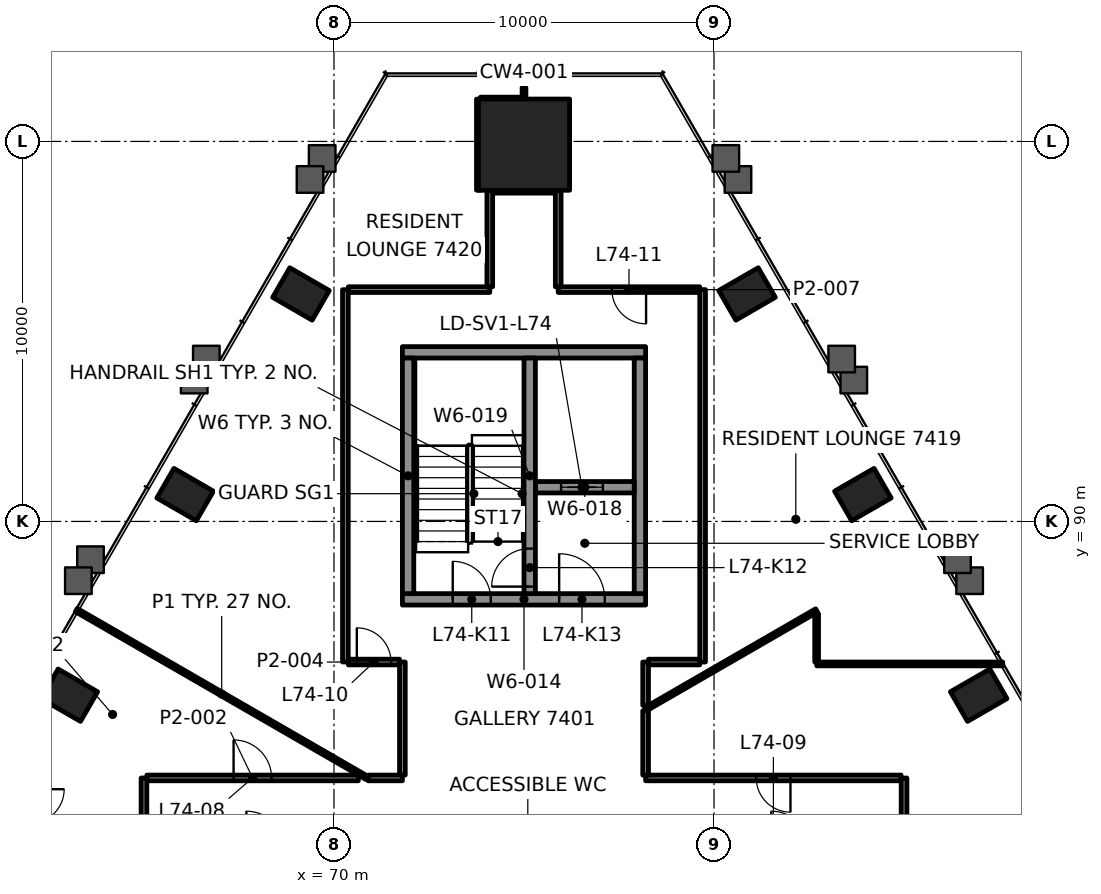
"""IFC4 building model, lengths in metres.
Left out: names, types, materials, properties, quantities, classifications, styles, units other than length and angle.
Written with IfcOpenShell. Run it as: python <this file> out.ifc"""

import sys

from ifc_helpers import new_model, si_unit, direction, frame, frame_2d, origin, origin_2d, place, context, subcontext, project, spatial, rectangle, hollow_rectangle, extrude, element, fill, save


model = new_model("IFC4")
c1 = context("Model", 3, precision=1e-05, world=origin(), true_north=direction((0.0, 1.0)))
c2 = subcontext(c1, "Body", "Model", "MODEL_VIEW")
j1 = project(units=[si_unit("LENGTHUNIT", "METRE"), si_unit("PLANEANGLEUNIT", "RADIAN")], contexts=[c1])
p1 = place(None, origin())
s1 = spatial("IfcSite", under=j1, at=p1, CompositionType="ELEMENT")
p2 = place(p1, origin())
s2 = spatial("IfcBuilding", under=s1, at=p2, CompositionType="ELEMENT")
p3 = place(p2, frame((0.0, 0.0, 305.6)))
s3 = spatial("IfcBuildingStorey", under=s2, at=p3, CompositionType="ELEMENT", Elevation=305.6)
p4 = place(p3, frame((75.0, 99.915, 0.0), z_axis=(0.0, 0.0, 1.0), x_axis=(-1.0, 0.0, 0.0)))
e1 = element("IfcColumn", 1, at=p4, inside=s3, PredefinedType="COLUMN", context=c2, shape_type="SweptSolid", body=[
    extrude(rectangle(XDim=2.4, YDim=2.4, at=origin_2d()), origin(), (0.0, 0.0, 1.0), 3.5),
])
for number, where, z_axis, x_axis in (
    (2, (86.965, 85.427, -0.0), (0.0, 0.0, 1.0), (-0.5, 0.866, 0.0)),
    (3, (83.917, 90.707, -0.0), (0.0, 0.0, 1.0), (-0.5, 0.866, 0.0)),
    (4, (80.869, 95.986, -0.0), (0.0, 0.0, 1.0), (-0.5, 0.866, 0.0)),
    (5, (69.131, 95.986, -0.0), (0.0, 0.0, 1.0), (-0.5, -0.866, 0.0)),
    (6, (66.083, 90.707, -0.0), (0.0, 0.0, 1.0), (-0.5, -0.866, 0.0)),
    (7, (63.035, 85.427, -0.0), (0.0, 0.0, 1.0), (-0.5, -0.866, 0.0)),
):
    element("IfcColumn", number, at=place(p3, frame(where, z_axis=z_axis, x_axis=x_axis)), inside=s3, PredefinedType="COLUMN", context=c2, shape_type="SweptSolid", body=[
        extrude(hollow_rectangle(XDim=0.9, YDim=1.2, WallThickness=0.06, at=origin_2d()), origin(), (0.0, 0.0, 1.0), 3.5),
    ])
p5 = place(p3, frame((71.8, 87.95, 0.0), z_axis=(0.0, 0.0, 1.0), x_axis=(1.0, 0.0, 0.0)))
e8 = element("IfcWall", 8, at=p5, inside=s3, PredefinedType="SHEAR", context=c2, shape_type="SweptSolid", body=[
    extrude(rectangle(XDim=6.4, YDim=0.3, at=frame_2d((3.2, 0.0))), origin(), (0.0, 0.0, 1.0), 3.3),
])
p6 = place(p5, frame((1.325, 0.0, 0.0)))
e9 = element("IfcOpeningElement", 9, at=p6, cuts=e8, PredefinedType="OPENING", context=c2, shape_type="SweptSolid", body=[
    extrude(rectangle(XDim=1.0, YDim=2.1, at=frame_2d((0.5, 1.05))), frame((0.0, 0.16, 0.0), z_axis=(0.0, -1.0, 0.0), x_axis=(1.0, 0.0, 0.0)), (0.0, 0.0, 1.0), 0.32),
])
p7 = place(p5, frame((4.125, 0.0, 0.0)))
e10 = element("IfcOpeningElement", 10, at=p7, cuts=e8, PredefinedType="OPENING", context=c2, shape_type="SweptSolid", body=[
    extrude(rectangle(XDim=1.2, YDim=2.1, at=frame_2d((0.6, 1.05))), frame((0.0, 0.16, 0.0), z_axis=(0.0, -1.0, 0.0), x_axis=(1.0, 0.0, 0.0)), (0.0, 0.0, 1.0), 0.32),
])
p8 = place(p3, frame((71.8, 94.45, 0.0), z_axis=(0.0, 0.0, 1.0), x_axis=(1.0, 0.0, 0.0)))
e11 = element("IfcWall", 11, at=p8, inside=s3, PredefinedType="SHEAR", context=c2, shape_type="SweptSolid", body=[
    extrude(rectangle(XDim=6.4, YDim=0.3, at=frame_2d((3.2, 0.0))), origin(), (0.0, 0.0, 1.0), 3.3),
])
for number, where, z_axis, x_axis in (
    (12, (71.95, 88.1, 0.0), (0.0, 0.0, 1.0), (0.0, 1.0, 0.0)),
    (13, (78.05, 88.1, 0.0), (0.0, 0.0, 1.0), (0.0, 1.0, 0.0)),
):
    element("IfcWall", number, at=place(p3, frame(where, z_axis=z_axis, x_axis=x_axis)), inside=s3, PredefinedType="SHEAR", context=c2, shape_type="SweptSolid", body=[
        extrude(rectangle(XDim=6.2, YDim=0.3, at=frame_2d((3.1, 0.0))), origin(), (0.0, 0.0, 1.0), 3.3),
    ])
p9 = place(p3, frame((75.3, 90.9, 0.0), z_axis=(0.0, 0.0, 1.0), x_axis=(1.0, 0.0, 0.0)))
e14 = element("IfcWall", 14, at=p9, inside=s3, PredefinedType="SHEAR", context=c2, shape_type="SweptSolid", body=[
    extrude(rectangle(XDim=2.6, YDim=0.3, at=frame_2d((1.3, 0.0))), origin(), (0.0, 0.0, 1.0), 3.3),
])
p10 = place(p9, frame((0.675, 0.0, 0.0)))
e15 = element("IfcOpeningElement", 15, at=p10, cuts=e14, PredefinedType="OPENING", context=c2, shape_type="SweptSolid", body=[
    extrude(rectangle(XDim=1.1, YDim=2.1, at=frame_2d((0.55, 1.05))), frame((0.0, 0.16, 0.0), z_axis=(0.0, -1.0, 0.0), x_axis=(1.0, 0.0, 0.0)), (0.0, 0.0, 1.0), 0.32),
])
p11 = place(p3, frame((75.15, 88.1, 0.0), z_axis=(0.0, 0.0, 1.0), x_axis=(0.0, 1.0, 0.0)))
e16 = element("IfcWall", 16, at=p11, inside=s3, PredefinedType="SHEAR", context=c2, shape_type="SweptSolid", body=[
    extrude(rectangle(XDim=6.2, YDim=0.3, at=frame_2d((3.1, 0.0))), origin(), (0.0, 0.0, 1.0), 3.3),
])
p12 = place(p11, frame((0.185, 0.0, 0.0)))
e17 = element("IfcOpeningElement", 17, at=p12, cuts=e16, PredefinedType="OPENING", context=c2, shape_type="SweptSolid", body=[
    extrude(rectangle(XDim=1.0, YDim=2.1, at=frame_2d((0.5, 1.05))), frame((0.0, 0.16, 0.0), z_axis=(0.0, -1.0, 0.0), x_axis=(1.0, 0.0, 0.0)), (0.0, 0.0, 1.0), 0.32),
])
p13 = place(p3, frame((65.075, 83.25, 0.0), z_axis=(0.0, 0.0, 1.0), x_axis=(1.0, 0.0, 0.0)))
e18 = element("IfcWall", 18, at=p13, inside=s3, PredefinedType="PARTITIONING", context=c2, shape_type="SweptSolid", body=[
    extrude(rectangle(XDim=5.565, YDim=0.15, at=frame_2d((2.783, 0.0))), origin(), (0.0, 0.0, 1.0), 2.7),
])
p14 = place(p13, frame((2.283, 0.0, 0.0)))
e19 = element("IfcOpeningElement", 19, at=p14, cuts=e18, PredefinedType="OPENING", context=c2, shape_type="SweptSolid", body=[
    extrude(rectangle(XDim=1.0, YDim=2.1, at=frame_2d((0.5, 1.05))), frame((0.0, 0.085, 0.0), z_axis=(0.0, -1.0, 0.0), x_axis=(1.0, 0.0, 0.0)), (0.0, 0.0, 1.0), 0.17),
])
p15 = place(p3, frame((84.923, 83.25, 0.0), z_axis=(0.0, 0.0, 1.0), x_axis=(-1.0, 0.0, 0.0)))
e20 = element("IfcWall", 20, at=p15, inside=s3, PredefinedType="PARTITIONING", context=c2, shape_type="SweptSolid", body=[
    extrude(rectangle(XDim=6.723, YDim=0.15, at=frame_2d((3.362, 0.0))), origin(), (0.0, 0.0, 1.0), 2.7),
])
p16 = place(p15, frame((2.911, 0.0, 0.0)))
e21 = element("IfcOpeningElement", 21, at=p16, cuts=e20, PredefinedType="OPENING", context=c2, shape_type="SweptSolid", body=[
    extrude(rectangle(XDim=0.9, YDim=2.1, at=frame_2d((0.45, 1.05))), frame((0.0, 0.085, 0.0), z_axis=(0.0, -1.0, 0.0), x_axis=(1.0, 0.0, 0.0)), (0.0, 0.0, 1.0), 0.17),
])
p17 = place(p3, frame((82.702, 86.25, 0.0), z_axis=(0.0, 0.0, 1.0), x_axis=(1.0, 0.0, 0.0)))
e22 = element("IfcWall", 22, at=p17, inside=s3, PredefinedType="PARTITIONING", context=c2, shape_type="SweptSolid", body=[
    extrude(rectangle(XDim=4.896, YDim=0.1, at=frame_2d((2.448, 0.0))), origin(), (0.0, 0.0, 1.0), 2.688),
])
p18 = place(p3, frame((70.377, 86.3, 0.0), z_axis=(0.0, 0.0, 1.0), x_axis=(1.0, 0.0, 0.0)))
e23 = element("IfcWall", 23, at=p18, inside=s3, PredefinedType="PARTITIONING", context=c2, shape_type="SweptSolid", body=[
    extrude(rectangle(XDim=1.348, YDim=0.15, at=frame_2d((0.674, 0.0))), origin(), (0.0, 0.0, 1.0), 2.7),
])
p19 = place(p18, frame((0.224, 0.0, 0.0)))
e24 = element("IfcOpeningElement", 24, at=p19, cuts=e23, PredefinedType="OPENING", context=c2, shape_type="SweptSolid", body=[
    extrude(rectangle(XDim=0.9, YDim=2.1, at=frame_2d((0.45, 1.05))), frame((0.0, 0.085, 0.0), z_axis=(0.0, -1.0, 0.0), x_axis=(1.0, 0.0, 0.0)), (0.0, 0.0, 1.0), 0.17),
])
p20 = place(p3, frame((78.275, 86.3, 0.0), z_axis=(0.0, 0.0, 1.0), x_axis=(1.0, 0.0, 0.0)))
e25 = element("IfcWall", 25, at=p20, inside=s3, PredefinedType="PARTITIONING", context=c2, shape_type="SweptSolid", body=[
    extrude(rectangle(XDim=1.35, YDim=0.15, at=frame_2d((0.675, 0.0))), origin(), (0.0, 0.0, 1.0), 2.7),
])
p21 = place(p3, frame((70.377, 96.1, 0.0), z_axis=(0.0, 0.0, 1.0), x_axis=(1.0, 0.0, 0.0)))
e26 = element("IfcWall", 26, at=p21, inside=s3, PredefinedType="PARTITIONING", context=c2, shape_type="SweptSolid", body=[
    extrude(rectangle(XDim=3.723, YDim=0.15, at=frame_2d((1.861, 0.0))), origin(), (0.0, 0.0, 1.0), 2.7),
])
p22 = place(p3, frame((79.625, 96.1, 0.0), z_axis=(0.0, 0.0, 1.0), x_axis=(-1.0, 0.0, 0.0)))
e27 = element("IfcWall", 27, at=p22, inside=s3, PredefinedType="PARTITIONING", context=c2, shape_type="SweptSolid", body=[
    extrude(rectangle(XDim=3.724, YDim=0.15, at=frame_2d((1.862, 0.0))), origin(), (0.0, 0.0, 1.0), 2.7),
])
p23 = place(p22, frame((1.412, 0.0, 0.0)))
e28 = element("IfcOpeningElement", 28, at=p23, cuts=e27, PredefinedType="OPENING", context=c2, shape_type="SweptSolid", body=[
    extrude(rectangle(XDim=0.9, YDim=2.1, at=frame_2d((0.45, 1.05))), frame((0.0, 0.085, 0.0), z_axis=(0.0, -1.0, 0.0), x_axis=(1.0, 0.0, 0.0)), (0.0, 0.0, 1.0), 0.17),
])
p24 = place(p3, frame((74.182, 98.715, 0.0), z_axis=(0.0, 0.0, 1.0), x_axis=(1.0, 0.0, 0.0)))
e29 = element("IfcWall", 29, at=p24, inside=s3, PredefinedType="PARTITIONING", context=c2, shape_type="SweptSolid", body=[
    extrude(rectangle(XDim=1.642, YDim=0.15, at=frame_2d((0.821, 0.0))), origin(), (0.0, 0.0, 1.0), 2.697),
])
p25 = place(p3, frame((73.852, 101.115, 0.0), z_axis=(0.0, 0.0, 1.0), x_axis=(1.0, 0.0, 0.0)))
e30 = element("IfcWall", 30, at=p25, inside=s3, PredefinedType="PARTITIONING", context=c2, shape_type="SweptSolid", body=[
    extrude(rectangle(XDim=1.148, YDim=0.1, at=frame_2d((0.574, 0.0))), origin(), (0.0, 0.0, 1.0), 2.7),
])
p26 = place(p3, frame((78.2, 85.06, 0.0), z_axis=(0.0, 0.0, 1.0), x_axis=(0.866025161861, 0.500000419024, 0.0)))
e31 = element("IfcWall", 31, at=p26, inside=s3, PredefinedType="PARTITIONING", context=c2, shape_type="SweptSolid", body=[
    extrude(rectangle(XDim=5.195, YDim=0.1, at=frame_2d((2.598, 0.0))), origin(), (0.0, 0.0, 1.0), 2.7),
])
p27 = place(p3, frame((85.0, 70.266, 0.0), z_axis=(0.0, 0.0, 1.0), x_axis=(0.0, 1.0, 0.0)))
e32 = element("IfcWall", 32, at=p27, inside=s3, PredefinedType="PARTITIONING", context=c2, shape_type="SweptSolid", body=[
    extrude(rectangle(XDim=12.982, YDim=0.15, at=frame_2d((6.491, 0.0))), origin(), (0.0, 0.0, 1.0), 2.7),
])
p28 = place(p3, frame((82.7, 86.302, 0.0), z_axis=(0.0, 0.0, 1.0), x_axis=(0.0, 1.0, 0.0)))
e33 = element("IfcWall", 33, at=p28, inside=s3, PredefinedType="PARTITIONING", context=c2, shape_type="SweptSolid", body=[
    extrude(rectangle(XDim=1.267, YDim=0.1, at=frame_2d((0.634, 0.0))), origin(), (0.0, 0.0, 1.0), 2.7),
])
p29 = place(p3, frame((79.7, 86.301, 0.0), z_axis=(0.0, 0.0, 1.0), x_axis=(0.0, 1.0, 0.0)))
e34 = element("IfcWall", 34, at=p29, inside=s3, PredefinedType="PARTITIONING", context=c2, shape_type="SweptSolid", body=[
    extrude(rectangle(XDim=9.799, YDim=0.15, at=frame_2d((4.899, 0.0))), origin(), (0.0, 0.0, 1.0), 2.7),
])
p30 = place(p3, frame((78.2, 83.325, 0.0), z_axis=(0.0, 0.0, 1.0), x_axis=(0.0, 1.0, 0.0)))
e35 = element("IfcWall", 35, at=p30, inside=s3, PredefinedType="PARTITIONING", context=c2, shape_type="SweptSolid", body=[
    extrude(rectangle(XDim=1.692, YDim=0.15, at=frame_2d((0.846, 0.0))), origin(), (0.0, 0.0, 1.0), 2.7),
])
p31 = place(p3, frame((75.9, 96.175, 0.0), z_axis=(0.0, 0.0, 1.0), x_axis=(0.0, 1.0, 0.0)))
e36 = element("IfcWall", 36, at=p31, inside=s3, PredefinedType="PARTITIONING", context=c2, shape_type="SweptSolid", body=[
    extrude(rectangle(XDim=2.54, YDim=0.15, at=frame_2d((1.27, 0.0))), origin(), (0.0, 0.0, 1.0), 2.7),
])
p32 = place(p3, frame((75.0, 101.165, 0.0), z_axis=(0.0, 0.0, 1.0), x_axis=(0.0, 1.0, 0.0)))
e37 = element("IfcWall", 37, at=p32, inside=s3, PredefinedType="PARTITIONING", context=c2, shape_type="SweptSolid", body=[
    extrude(rectangle(XDim=0.25, YDim=0.1, at=frame_2d((0.125, 0.0))), origin(), (0.0, 0.0, 1.0), 2.7),
])
p33 = place(p3, frame((74.1, 96.175, 0.0), z_axis=(0.0, 0.0, 1.0), x_axis=(0.0, 1.0, 0.0)))
e38 = element("IfcWall", 38, at=p33, inside=s3, PredefinedType="PARTITIONING", context=c2, shape_type="SweptSolid", body=[
    extrude(rectangle(XDim=2.54, YDim=0.15, at=frame_2d((1.27, 0.0))), origin(), (0.0, 0.0, 1.0), 2.7),
])
p34 = place(p3, frame((73.8, 98.717, 0.0), z_axis=(0.0, 0.0, 1.0), x_axis=(0.0, 1.0, 0.0)))
e39 = element("IfcWall", 39, at=p34, inside=s3, PredefinedType="PARTITIONING", context=c2, shape_type="SweptSolid", body=[
    extrude(rectangle(XDim=2.396, YDim=0.1, at=frame_2d((1.198, 0.0))), origin(), (0.0, 0.0, 1.0), 2.7),
])
p35 = place(p3, frame((71.8, 83.325, 0.0), z_axis=(0.0, 0.0, 1.0), x_axis=(0.0, 1.0, 0.0)))
e40 = element("IfcWall", 40, at=p35, inside=s3, PredefinedType="PARTITIONING", context=c2, shape_type="SweptSolid", body=[
    extrude(rectangle(XDim=2.975, YDim=0.15, at=frame_2d((1.488, 0.0))), origin(), (0.0, 0.0, 1.0), 2.7),
])
p36 = place(p3, frame((70.3, 86.302, 0.0), z_axis=(0.0, 0.0, 1.0), x_axis=(0.0, 1.0, 0.0)))
e41 = element("IfcWall", 41, at=p36, inside=s3, PredefinedType="PARTITIONING", context=c2, shape_type="SweptSolid", body=[
    extrude(rectangle(XDim=9.796, YDim=0.15, at=frame_2d((4.898, 0.0))), origin(), (0.0, 0.0, 1.0), 2.7),
])
p37 = place(p3, frame((65.0, 70.266, 0.0), z_axis=(0.0, 0.0, 1.0), x_axis=(0.0, 1.0, 0.0)))
e42 = element("IfcWall", 42, at=p37, inside=s3, PredefinedType="PARTITIONING", context=c2, shape_type="SweptSolid", body=[
    extrude(rectangle(XDim=12.984, YDim=0.15, at=frame_2d((6.492, 0.0))), origin(), (0.0, 0.0, 1.0), 2.7),
])
p38 = place(p3, frame((70.871, 83.25, 0.0), z_axis=(0.0, 0.0, 1.0), x_axis=(-0.866018527528, 0.500011909837, 0.0)))
e43 = element("IfcWall", 43, at=p38, inside=s3, PredefinedType="PARTITIONING", context=c2, shape_type="SweptSolid", body=[
    extrude(rectangle(XDim=8.834, YDim=0.1, at=frame_2d((4.417, 0.0))), origin(), (0.0, 0.0, 1.0), 2.688),
])
p39 = place(p3, frame((70.896, 83.25, 0.0), z_axis=(0.0, 0.0, 1.0), x_axis=(1.0, 0.0, 0.0)))
e44 = element("IfcWall", 44, at=p39, inside=s3, PredefinedType="PARTITIONING", context=c2, shape_type="SweptSolid", body=[
    extrude(rectangle(XDim=0.905, YDim=0.15, at=frame_2d((0.452, 0.0))), origin(), (0.0, 0.0, 1.0), 2.7),
])
p40 = place(p3, frame((78.2, 85.161, 0.0), z_axis=(0.0, 0.0, 1.0), x_axis=(0.0, 1.0, 0.0)))
e45 = element("IfcWall", 45, at=p40, inside=s3, PredefinedType="PARTITIONING", context=c2, shape_type="SweptSolid", body=[
    extrude(rectangle(XDim=1.139, YDim=0.15, at=frame_2d((0.57, 0.0))), origin(), (0.0, 0.0, 1.0), 2.7),
])
p41 = place(p14, origin())
e46 = element("IfcDoor", 46, at=p41, inside=s3, OperationType="SINGLE_SWING_RIGHT", PredefinedType="DOOR", context=c2, shape_type="SweptSolid", body=[
    extrude(rectangle(XDim=1.0, YDim=2.1, at=frame_2d((0.5, 1.05))), frame((0.0, 0.025, 0.0), z_axis=(0.0, -1.0, 0.0), x_axis=(1.0, 0.0, 0.0)), (0.0, 0.0, 1.0), 0.05),
])
fill(e19, e46)
p42 = place(p16, origin())
e47 = element("IfcDoor", 47, at=p42, inside=s3, OperationType="SINGLE_SWING_RIGHT", PredefinedType="DOOR", context=c2, shape_type="SweptSolid", body=[
    extrude(rectangle(XDim=0.9, YDim=2.1, at=frame_2d((0.45, 1.05))), frame((0.0, 0.025, 0.0), z_axis=(0.0, -1.0, 0.0), x_axis=(1.0, 0.0, 0.0)), (0.0, 0.0, 1.0), 0.05),
])
fill(e21, e47)
p43 = place(p19, origin())
e48 = element("IfcDoor", 48, at=p43, inside=s3, OperationType="SINGLE_SWING_LEFT", PredefinedType="DOOR", context=c2, shape_type="SweptSolid", body=[
    extrude(rectangle(XDim=0.9, YDim=2.1, at=frame_2d((0.45, 1.05))), frame((0.0, 0.025, 0.0), z_axis=(0.0, -1.0, 0.0), x_axis=(1.0, 0.0, 0.0)), (0.0, 0.0, 1.0), 0.05),
])
fill(e24, e48)
p44 = place(p23, origin())
e49 = element("IfcDoor", 49, at=p44, inside=s3, OperationType="SINGLE_SWING_LEFT", PredefinedType="DOOR", context=c2, shape_type="SweptSolid", body=[
    extrude(rectangle(XDim=0.9, YDim=2.1, at=frame_2d((0.45, 1.05))), frame((0.0, 0.025, 0.0), z_axis=(0.0, -1.0, 0.0), x_axis=(1.0, 0.0, 0.0)), (0.0, 0.0, 1.0), 0.05),
])
fill(e28, e49)
p45 = place(p10, origin())
e50 = element("IfcDoor", 50, at=p45, inside=s3, OperationType="DOUBLE_DOOR_SLIDING", PredefinedType="DOOR", context=c2, shape_type="SweptSolid", body=[
    extrude(rectangle(XDim=1.1, YDim=2.1, at=frame_2d((0.55, 1.05))), frame((0.0, 0.025, 0.0), z_axis=(0.0, -1.0, 0.0), x_axis=(1.0, 0.0, 0.0)), (0.0, 0.0, 1.0), 0.05),
])
fill(e15, e50)
p46 = place(p6, origin())
e51 = element("IfcDoor", 51, at=p46, inside=s3, OperationType="SINGLE_SWING_RIGHT", PredefinedType="DOOR", context=c2, shape_type="SweptSolid", body=[
    extrude(rectangle(XDim=1.0, YDim=2.1, at=frame_2d((0.5, 1.05))), frame((0.0, 0.025, 0.0), z_axis=(0.0, -1.0, 0.0), x_axis=(1.0, 0.0, 0.0)), (0.0, 0.0, 1.0), 0.05),
])
fill(e9, e51)
p47 = place(p12, origin())
e52 = element("IfcDoor", 52, at=p47, inside=s3, OperationType="SINGLE_SWING_LEFT", PredefinedType="DOOR", context=c2, shape_type="SweptSolid", body=[
    extrude(rectangle(XDim=1.0, YDim=2.1, at=frame_2d((0.5, 1.05))), frame((0.0, 0.025, 0.0), z_axis=(0.0, -1.0, 0.0), x_axis=(1.0, 0.0, 0.0)), (0.0, 0.0, 1.0), 0.05),
])
fill(e17, e52)
p48 = place(p7, origin())
e53 = element("IfcDoor", 53, at=p48, inside=s3, OperationType="SINGLE_SWING_RIGHT", PredefinedType="DOOR", context=c2, shape_type="SweptSolid", body=[
    extrude(rectangle(XDim=1.2, YDim=2.1, at=frame_2d((0.6, 1.05))), frame((0.0, 0.025, 0.0), z_axis=(0.0, -1.0, 0.0), x_axis=(1.0, 0.0, 0.0)), (0.0, 0.0, 1.0), 0.05),
])
fill(e10, e53)
save(model, sys.argv[1])
